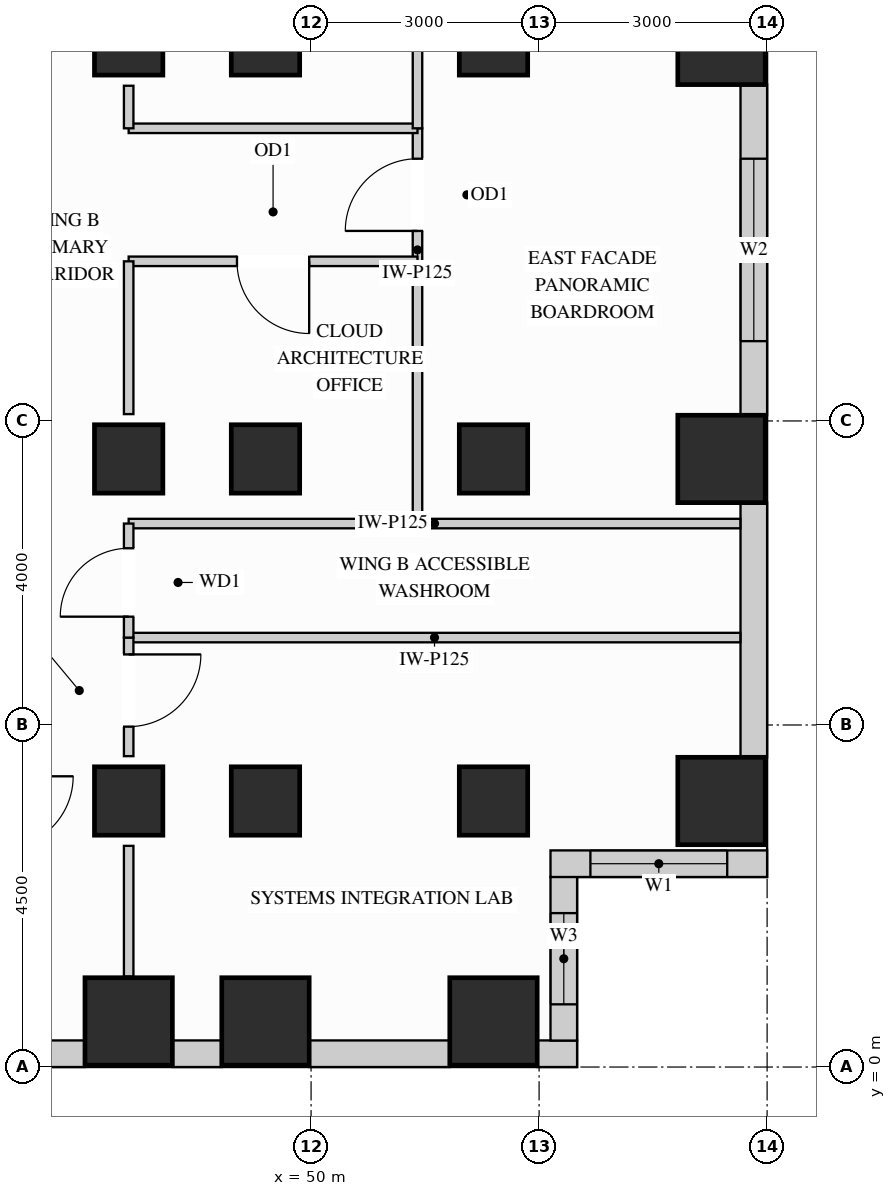
"""IFC4 building model, lengths in metres.
Left out: names, types, materials, properties, quantities, classifications, styles, units other than length and angle.
Written with IfcOpenShell. Run it as: python <this file> out.ifc"""

import sys

from ifc_helpers import new_model, si_unit, direction, frame, frame_2d, origin, origin_2d, place, context, subcontext, project, spatial, rectangle, extrude, source, transform, mapped, element, fill, save


model = new_model("IFC4")
c1 = context("Model", 3, precision=1e-05, world=origin(), true_north=direction((0.0, 1.0)))
c2 = subcontext(c1, "Body", "Model", "MODEL_VIEW")
j1 = project(units=[si_unit("LENGTHUNIT", "METRE"), si_unit("PLANEANGLEUNIT", "RADIAN")], contexts=[c1])
p1 = place(None, origin())
s1 = spatial("IfcSite", under=j1, at=p1, CompositionType="ELEMENT")
p2 = place(p1, origin())
s2 = spatial("IfcBuilding", under=s1, at=p2, CompositionType="ELEMENT")
p3 = place(p2, frame((0.0, 0.0, 102.6)))
s3 = spatial("IfcBuildingStorey", under=s2, at=p3, CompositionType="ELEMENT", Elevation=102.6)
m1 = source(origin(), c2, "Body", "SweptSolid", [
    extrude(rectangle(XDim=0.9, YDim=0.9, at=origin_2d()), origin(), (0.0, 0.0, 1.0), 3.38),
])
for number, where, z_axis, x_axis in (
    (1, (47.6, 13.5, 0.0), (0.0, 0.0, 1.0), (1.0, 0.0, 0.0)),
    (2, (47.6, 3.5, 0.0), (0.0, 0.0, 1.0), (1.0, 0.0, 0.0)),
    (3, (47.6, 8.0, 0.0), (0.0, 0.0, 1.0), (1.0, 0.0, 0.0)),
    (4, (49.4, 13.5, 0.0), (0.0, 0.0, 1.0), (1.0, 0.0, 0.0)),
    (5, (49.4, 3.5, 0.0), (0.0, 0.0, 1.0), (1.0, 0.0, 0.0)),
    (6, (49.4, 8.0, 0.0), (0.0, 0.0, 1.0), (1.0, 0.0, 0.0)),
    (7, (52.4, 13.5, 0.0), (0.0, 0.0, 1.0), (1.0, 0.0, 0.0)),
    (8, (52.4, 3.5, 0.0), (0.0, 0.0, 1.0), (1.0, 0.0, 0.0)),
    (9, (52.4, 8.0, 0.0), (0.0, 0.0, 1.0), (1.0, 0.0, 0.0)),
):
    element("IfcColumn", number, at=place(p3, frame(where, z_axis=z_axis, x_axis=x_axis)), inside=s3, PredefinedType="COLUMN", context=c2, shape_type="MappedRepresentation", body=[
        mapped(m1, transform((0.0, 0.0, 0.0), x_axis=(1.0, 0.0, 0.0), y_axis=(0.0, 1.0, 0.0), z_axis=(0.0, 0.0, 1.0))),
    ])
m2 = source(origin(), c2, "Body", "SweptSolid", [
    extrude(rectangle(XDim=1.15, YDim=1.15, at=origin_2d()), origin(), (0.0, 0.0, 1.0), 3.38),
])
for number, where, z_axis, x_axis in (
    (10, (55.4, 13.5, 0.0), (0.0, 0.0, 1.0), (1.0, 0.0, 0.0)),
    (11, (55.4, 3.5, 0.0), (0.0, 0.0, 1.0), (1.0, 0.0, 0.0)),
    (12, (55.4, 8.0, 0.0), (0.0, 0.0, 1.0), (1.0, 0.0, 0.0)),
    (13, (47.6, 0.6, 0.0), (0.0, 0.0, 1.0), (1.0, 0.0, 0.0)),
    (14, (49.4, 0.6, 0.0), (0.0, 0.0, 1.0), (1.0, 0.0, 0.0)),
    (15, (52.4, 0.6, 0.0), (0.0, 0.0, 1.0), (1.0, 0.0, 0.0)),
):
    element("IfcColumn", number, at=place(p3, frame(where, z_axis=z_axis, x_axis=x_axis)), inside=s3, PredefinedType="COLUMN", context=c2, shape_type="MappedRepresentation", body=[
        mapped(m2, transform((0.0, 0.0, 0.0), x_axis=(1.0, 0.0, 0.0), y_axis=(0.0, 1.0, 0.0), z_axis=(0.0, 0.0, 1.0))),
    ])
p4 = place(p3, frame((40.573, 0.175, 0.0), z_axis=(0.0, 0.0, 1.0), x_axis=(1.0, 0.0, 0.0)))
e16 = element("IfcWall", 16, at=p4, inside=s3, PredefinedType="SOLIDWALL", context=c2, shape_type="SweptSolid", body=[
    extrude(rectangle(XDim=6.454, YDim=0.35, at=frame_2d((3.227, 0.0))), origin(), (0.0, 0.0, 1.0), 2.428),
])
p5 = place(p4, frame((0.712, 0.0, 0.78)))
e17 = element("IfcOpeningElement", 17, at=p5, cuts=e16, PredefinedType="OPENING", context=c2, shape_type="SweptSolid", body=[
    extrude(rectangle(XDim=1.8, YDim=1.468, at=frame_2d((0.9, 0.734))), frame((0.0, 0.185, 0.0), z_axis=(0.0, -1.0, 0.0), x_axis=(1.0, 0.0, 0.0)), (0.0, 0.0, 1.0), 0.37),
])
p6 = place(p4, frame((2.905, 0.0, 0.78)))
e18 = element("IfcOpeningElement", 18, at=p6, cuts=e16, PredefinedType="OPENING", context=c2, shape_type="SweptSolid", body=[
    extrude(rectangle(XDim=1.8, YDim=1.468, at=frame_2d((0.9, 0.734))), frame((0.0, 0.185, 0.0), z_axis=(0.0, -1.0, 0.0), x_axis=(1.0, 0.0, 0.0)), (0.0, 0.0, 1.0), 0.37),
])
m3 = source(origin(), c2, "Body", "SweptSolid", [
    extrude(rectangle(XDim=0.654, YDim=0.35, at=frame_2d((0.327, 0.0))), origin(), (0.0, 0.0, 1.0), 3.365),
])
p7 = place(p3, frame((48.173, 0.175, 0.0), z_axis=(0.0, 0.0, 1.0), x_axis=(1.0, 0.0, 0.0)))
e19 = element("IfcWall", 19, at=p7, inside=s3, PredefinedType="SOLIDWALL", context=c2, shape_type="MappedRepresentation", body=[
    mapped(m3, transform((0.0, 0.0, 0.0), x_axis=(1.0, 0.0, 0.0), y_axis=(0.0, 1.0, 0.0), z_axis=(0.0, 0.0, 1.0))),
])
m4 = source(origin(), c2, "Body", "SweptSolid", [
    extrude(rectangle(XDim=1.854, YDim=0.35, at=frame_2d((0.927, 0.0))), origin(), (0.0, 0.0, 1.0), 3.365),
])
p8 = place(p3, frame((49.973, 0.175, 0.0), z_axis=(0.0, 0.0, 1.0), x_axis=(1.0, 0.0, 0.0)))
e20 = element("IfcWall", 20, at=p8, inside=s3, PredefinedType="SOLIDWALL", context=c2, shape_type="MappedRepresentation", body=[
    mapped(m4, transform((0.0, 0.0, 0.0), x_axis=(1.0, 0.0, 0.0), y_axis=(0.0, 1.0, 0.0), z_axis=(0.0, 0.0, 1.0))),
])
m5 = source(origin(), c2, "Body", "SweptSolid", [
    extrude(rectangle(XDim=0.527, YDim=0.35, at=frame_2d((0.264, 0.0))), origin(), (0.0, 0.0, 1.0), 3.365),
])
p9 = place(p3, frame((52.973, 0.175, 0.0), z_axis=(0.0, 0.0, 1.0), x_axis=(1.0, 0.0, 0.0)))
e21 = element("IfcWall", 21, at=p9, inside=s3, PredefinedType="SOLIDWALL", context=c2, shape_type="MappedRepresentation", body=[
    mapped(m5, transform((0.0, 0.0, 0.0), x_axis=(1.0, 0.0, 0.0), y_axis=(0.0, 1.0, 0.0), z_axis=(0.0, 0.0, 1.0))),
])
p10 = place(p3, frame((53.325, 0.348, 0.0), z_axis=(0.0, 0.0, 1.0), x_axis=(0.0, 1.0, 0.0)))
e22 = element("IfcWall", 22, at=p10, inside=s3, PredefinedType="SOLIDWALL", context=c2, shape_type="SweptSolid", body=[
    extrude(rectangle(XDim=2.154, YDim=0.35, at=frame_2d((1.077, 0.0))), origin(), (0.0, 0.0, 1.0), 3.365),
])
p11 = place(p10, frame((0.477, 0.0, 0.78)))
e23 = element("IfcOpeningElement", 23, at=p11, cuts=e22, PredefinedType="OPENING", context=c2, shape_type="SweptSolid", body=[
    extrude(rectangle(XDim=1.2, YDim=2.1, at=frame_2d((0.6, 1.05))), frame((0.0, 0.185, 0.0), z_axis=(0.0, -1.0, 0.0), x_axis=(1.0, 0.0, 0.0)), (0.0, 0.0, 1.0), 0.37),
])
p12 = place(p3, frame((53.15, 2.675, 0.0), z_axis=(0.0, 0.0, 1.0), x_axis=(1.0, 0.0, 0.0)))
e24 = element("IfcWall", 24, at=p12, inside=s3, PredefinedType="SOLIDWALL", context=c2, shape_type="SweptSolid", body=[
    extrude(rectangle(XDim=2.85, YDim=0.35, at=frame_2d((1.425, 0.0))), origin(), (0.0, 0.0, 1.0), 3.365),
])
p13 = place(p12, frame((0.525, 0.0, 0.78)))
e25 = element("IfcOpeningElement", 25, at=p13, cuts=e24, PredefinedType="OPENING", context=c2, shape_type="SweptSolid", body=[
    extrude(rectangle(XDim=1.8, YDim=2.1, at=frame_2d((0.9, 1.05))), frame((0.0, 0.185, 0.0), z_axis=(0.0, -1.0, 0.0), x_axis=(1.0, 0.0, 0.0)), (0.0, 0.0, 1.0), 0.37),
])
m6 = source(origin(), c2, "Body", "SweptSolid", [
    extrude(rectangle(XDim=3.354, YDim=0.35, at=frame_2d((1.677, 0.0))), origin(), (0.0, 0.0, 1.0), 3.365),
])
p14 = place(p3, frame((55.825, 4.073, 0.0), z_axis=(0.0, 0.0, 1.0), x_axis=(0.0, 1.0, 0.0)))
e26 = element("IfcWall", 26, at=p14, inside=s3, PredefinedType="SOLIDWALL", context=c2, shape_type="MappedRepresentation", body=[
    mapped(m6, transform((0.0, 0.0, 0.0), x_axis=(1.0, 0.0, 0.0), y_axis=(0.0, 1.0, 0.0), z_axis=(0.0, 0.0, 1.0))),
])
p15 = place(p3, frame((55.825, 8.573, 0.0), z_axis=(0.0, 0.0, 1.0), x_axis=(0.0, 1.0, 0.0)))
e27 = element("IfcWall", 27, at=p15, inside=s3, PredefinedType="SOLIDWALL", context=c2, shape_type="SweptSolid", body=[
    extrude(rectangle(XDim=4.354, YDim=0.35, at=frame_2d((2.177, 0.0))), origin(), (0.0, 0.0, 1.0), 3.365),
])
p16 = place(p15, frame((0.977, 0.0, 0.78)))
e28 = element("IfcOpeningElement", 28, at=p16, cuts=e27, PredefinedType="OPENING", context=c2, shape_type="SweptSolid", body=[
    extrude(rectangle(XDim=2.4, YDim=2.1, at=frame_2d((1.2, 1.05))), frame((0.0, 0.185, 0.0), z_axis=(0.0, -1.0, 0.0), x_axis=(1.0, 0.0, 0.0)), (0.0, 0.0, 1.0), 0.37),
])
p17 = place(p3, frame((51.4, 10.6, 0.0), z_axis=(0.0, 0.0, 1.0), x_axis=(0.0, 1.0, 0.0)))
e29 = element("IfcWall", 29, at=p17, inside=s3, PredefinedType="PARTITIONING", context=c2, shape_type="SweptSolid", body=[
    extrude(rectangle(XDim=1.75, YDim=0.125, at=frame_2d((0.875, 0.0))), origin(), (0.0, 0.0, 1.0), 3.365),
])
p18 = place(p17, frame((0.4, 0.0, 0.0)))
e30 = element("IfcOpeningElement", 30, at=p18, cuts=e29, PredefinedType="OPENING", context=c2, shape_type="SweptSolid", body=[
    extrude(rectangle(XDim=0.95, YDim=2.15, at=frame_2d((0.475, 1.075))), frame((0.0, 0.073, 0.0), z_axis=(0.0, -1.0, 0.0), x_axis=(1.0, 0.0, 0.0)), (0.0, 0.0, 1.0), 0.145),
])
m7 = source(origin(), c2, "Body", "SweptSolid", [
    extrude(rectangle(XDim=8.048, YDim=0.125, at=frame_2d((4.024, 0.0))), origin(), (0.0, 0.0, 1.0), 3.365),
])
for number, where, z_axis, x_axis in (
    (31, (47.6, 5.65, 0.0), (0.0, 0.0, 1.0), (1.0, 0.0, 0.0)),
    (32, (47.6, 7.15, 0.0), (0.0, 0.0, 1.0), (1.0, 0.0, 0.0)),
):
    element("IfcWall", number, at=place(p3, frame(where, z_axis=z_axis, x_axis=x_axis)), inside=s3, PredefinedType="PARTITIONING", context=c2, shape_type="MappedRepresentation", body=[
        mapped(m7, transform((0.0, 0.0, 0.0), x_axis=(1.0, 0.0, 0.0), y_axis=(0.0, 1.0, 0.0), z_axis=(0.0, 0.0, 1.0))),
    ])
m8 = source(origin(), c2, "Body", "SweptSolid", [
    extrude(rectangle(XDim=3.8, YDim=0.125, at=frame_2d((1.9, 0.0))), origin(), (0.0, 0.0, 1.0), 3.365),
])
p19 = place(p3, frame((47.6, 12.35, 0.0), z_axis=(0.0, 0.0, 1.0), x_axis=(1.0, 0.0, 0.0)))
e33 = element("IfcWall", 33, at=p19, inside=s3, PredefinedType="PARTITIONING", context=c2, shape_type="MappedRepresentation", body=[
    mapped(m8, transform((0.0, 0.0, 0.0), x_axis=(1.0, 0.0, 0.0), y_axis=(0.0, 1.0, 0.0), z_axis=(0.0, 0.0, 1.0))),
])
p20 = place(p3, frame((47.6, 10.6, 0.0), z_axis=(0.0, 0.0, 1.0), x_axis=(1.0, 0.0, 0.0)))
e34 = element("IfcWall", 34, at=p20, inside=s3, PredefinedType="PARTITIONING", context=c2, shape_type="SweptSolid", body=[
    extrude(rectangle(XDim=3.8, YDim=0.125, at=frame_2d((1.9, 0.0))), origin(), (0.0, 0.0, 1.0), 2.677),
])
p21 = place(p20, frame((1.425, 0.0, 0.0)))
e35 = element("IfcOpeningElement", 35, at=p21, cuts=e34, PredefinedType="OPENING", context=c2, shape_type="SweptSolid", body=[
    extrude(rectangle(XDim=0.95, YDim=2.15, at=frame_2d((0.475, 1.075))), frame((0.0, 0.073, 0.0), z_axis=(0.0, -1.0, 0.0), x_axis=(1.0, 0.0, 0.0)), (0.0, 0.0, 1.0), 0.145),
])
m9 = source(origin(), c2, "Body", "SweptSolid", [
    extrude(rectangle(XDim=3.45, YDim=0.125, at=frame_2d((1.725, 0.0))), origin(), (0.0, 0.0, 1.0), 3.365),
])
p22 = place(p3, frame((51.4, 7.15, 0.0), z_axis=(0.0, 0.0, 1.0), x_axis=(0.0, 1.0, 0.0)))
e36 = element("IfcWall", 36, at=p22, inside=s3, PredefinedType="PARTITIONING", context=c2, shape_type="MappedRepresentation", body=[
    mapped(m9, transform((0.0, 0.0, 0.0), x_axis=(1.0, 0.0, 0.0), y_axis=(0.0, 1.0, 0.0), z_axis=(0.0, 0.0, 1.0))),
])
m10 = source(origin(), c2, "Body", "SweptSolid", [
    extrude(rectangle(XDim=9.79, YDim=0.125, at=frame_2d((4.895, 0.0))), origin(), (0.0, 0.0, 1.0), 3.365),
])
p23 = place(p3, frame((51.4, 12.35, 0.0), z_axis=(0.0, 0.0, 1.0), x_axis=(0.0, 1.0, 0.0)))
e37 = element("IfcWall", 37, at=p23, inside=s3, PredefinedType="PARTITIONING", context=c2, shape_type="MappedRepresentation", body=[
    mapped(m10, transform((0.0, 0.0, 0.0), x_axis=(1.0, 0.0, 0.0), y_axis=(0.0, 1.0, 0.0), z_axis=(0.0, 0.0, 1.0))),
])
p24 = place(p3, frame((47.6, 4.09, 0.0), z_axis=(0.0, 0.0, 1.0), x_axis=(0.0, 1.0, 0.0)))
e38 = element("IfcWall", 38, at=p24, inside=s3, PredefinedType="PARTITIONING", context=c2, shape_type="SweptSolid", body=[
    extrude(rectangle(XDim=1.56, YDim=0.125, at=frame_2d((0.78, 0.0))), origin(), (0.0, 0.0, 1.0), 2.677),
])
p25 = place(p24, frame((0.388, 0.0, 0.0)))
e39 = element("IfcOpeningElement", 39, at=p25, cuts=e38, PredefinedType="OPENING", context=c2, shape_type="SweptSolid", body=[
    extrude(rectangle(XDim=0.95, YDim=2.15, at=frame_2d((0.475, 1.075))), frame((0.0, 0.073, 0.0), z_axis=(0.0, -1.0, 0.0), x_axis=(1.0, 0.0, 0.0)), (0.0, 0.0, 1.0), 0.145),
])
m11 = source(origin(), c2, "Body", "SweptSolid", [
    extrude(rectangle(XDim=1.72, YDim=0.125, at=frame_2d((0.86, 0.0))), origin(), (0.0, 0.0, 1.0), 2.677),
])
p26 = place(p3, frame((47.6, 1.19, 0.0), z_axis=(0.0, 0.0, 1.0), x_axis=(0.0, 1.0, 0.0)))
e40 = element("IfcWall", 40, at=p26, inside=s3, PredefinedType="PARTITIONING", context=c2, shape_type="MappedRepresentation", body=[
    mapped(m11, transform((0.0, 0.0, 0.0), x_axis=(1.0, 0.0, 0.0), y_axis=(0.0, 1.0, 0.0), z_axis=(0.0, 0.0, 1.0))),
])
m12 = source(origin(), c2, "Body", "SweptSolid", [
    extrude(rectangle(XDim=2.01, YDim=0.125, at=frame_2d((1.005, 0.0))), origin(), (0.0, 0.0, 1.0), 2.677),
])
p27 = place(p3, frame((47.6, 8.59, 0.0), z_axis=(0.0, 0.0, 1.0), x_axis=(0.0, 1.0, 0.0)))
e41 = element("IfcWall", 41, at=p27, inside=s3, PredefinedType="PARTITIONING", context=c2, shape_type="MappedRepresentation", body=[
    mapped(m12, transform((0.0, 0.0, 0.0), x_axis=(1.0, 0.0, 0.0), y_axis=(0.0, 1.0, 0.0), z_axis=(0.0, 0.0, 1.0))),
])
m13 = source(origin(), c2, "Body", "SweptSolid", [
    extrude(rectangle(XDim=0.56, YDim=0.125, at=frame_2d((0.28, 0.0))), origin(), (0.0, 0.0, 1.0), 2.677),
])
p28 = place(p3, frame((47.6, 12.35, 0.0), z_axis=(0.0, 0.0, 1.0), x_axis=(0.0, 1.0, 0.0)))
e42 = element("IfcWall", 42, at=p28, inside=s3, PredefinedType="PARTITIONING", context=c2, shape_type="MappedRepresentation", body=[
    mapped(m13, transform((0.0, 0.0, 0.0), x_axis=(1.0, 0.0, 0.0), y_axis=(0.0, 1.0, 0.0), z_axis=(0.0, 0.0, 1.0))),
])
p29 = place(p3, frame((47.6, 5.65, 0.0), z_axis=(0.0, 0.0, 1.0), x_axis=(0.0, 1.0, 0.0)))
e43 = element("IfcWall", 43, at=p29, inside=s3, PredefinedType="PARTITIONING", context=c2, shape_type="SweptSolid", body=[
    extrude(rectangle(XDim=1.5, YDim=0.125, at=frame_2d((0.75, 0.0))), origin(), (0.0, 0.0, 1.0), 2.677),
])
p30 = place(p29, frame((0.275, 0.0, 0.0)))
e44 = element("IfcOpeningElement", 44, at=p30, cuts=e43, PredefinedType="OPENING", context=c2, shape_type="SweptSolid", body=[
    extrude(rectangle(XDim=0.9, YDim=2.15, at=frame_2d((0.45, 1.075))), frame((0.0, 0.073, 0.0), z_axis=(0.0, -1.0, 0.0), x_axis=(1.0, 0.0, 0.0)), (0.0, 0.0, 1.0), 0.145),
])
m14 = source(origin(), c2, "Body", "SweptSolid", [
    extrude(rectangle(XDim=0.95, YDim=2.15, at=frame_2d((0.475, 1.075))), frame((0.0, 0.025, 0.0), z_axis=(0.0, -1.0, 0.0), x_axis=(1.0, 0.0, 0.0)), (0.0, 0.0, 1.0), 0.05),
])
p31 = place(p25, origin())
e45 = element("IfcDoor", 45, at=p31, inside=s3, OperationType="SINGLE_SWING_RIGHT", PredefinedType="DOOR", context=c2, shape_type="MappedRepresentation", body=[
    mapped(m14, transform((0.0, 0.0, 0.0), x_axis=(1.0, 0.0, 0.0), y_axis=(0.0, 1.0, 0.0), z_axis=(0.0, 0.0, 1.0))),
])
fill(e39, e45)
p32 = place(p21, origin())
e46 = element("IfcDoor", 46, at=p32, inside=s3, OperationType="SINGLE_SWING_RIGHT", PredefinedType="DOOR", context=c2, shape_type="MappedRepresentation", body=[
    mapped(m14, transform((0.0, 0.0, 0.0), x_axis=(1.0, 0.0, 0.0), y_axis=(0.0, 1.0, 0.0), z_axis=(0.0, 0.0, 1.0))),
])
fill(e35, e46)
p33 = place(p18, origin())
e47 = element("IfcDoor", 47, at=p33, inside=s3, OperationType="SINGLE_SWING_LEFT", PredefinedType="DOOR", context=c2, shape_type="MappedRepresentation", body=[
    mapped(m14, transform((0.0, 0.0, 0.0), x_axis=(1.0, 0.0, 0.0), y_axis=(0.0, 1.0, 0.0), z_axis=(0.0, 0.0, 1.0))),
])
fill(e30, e47)
m15 = source(origin(), c2, "Body", "SweptSolid", [
    extrude(rectangle(XDim=0.9, YDim=2.15, at=frame_2d((0.45, 1.075))), frame((0.0, 0.025, 0.0), z_axis=(0.0, -1.0, 0.0), x_axis=(1.0, 0.0, 0.0)), (0.0, 0.0, 1.0), 0.05),
])
p34 = place(p30, origin())
e48 = element("IfcDoor", 48, at=p34, inside=s3, OperationType="SINGLE_SWING_LEFT", PredefinedType="DOOR", context=c2, shape_type="MappedRepresentation", body=[
    mapped(m15, transform((0.0, 0.0, 0.0), x_axis=(1.0, 0.0, 0.0), y_axis=(0.0, 1.0, 0.0), z_axis=(0.0, 0.0, 1.0))),
])
fill(e44, e48)
m16 = source(origin(), c2, "Body", "SweptSolid", [
    extrude(rectangle(XDim=1.8, YDim=2.1, at=frame_2d((0.9, 1.05))), frame((0.0, 0.03, 0.0), z_axis=(0.0, -1.0, 0.0), x_axis=(1.0, 0.0, 0.0)), (0.0, 0.0, 1.0), 0.06),
])
p35 = place(p13, origin())
e49 = element("IfcWindow", 49, at=p35, inside=s3, PartitioningType="SINGLE_PANEL", PredefinedType="WINDOW", context=c2, shape_type="MappedRepresentation", body=[
    mapped(m16, transform((0.0, 0.0, 0.0), x_axis=(1.0, 0.0, 0.0), y_axis=(0.0, 1.0, 0.0), z_axis=(0.0, 0.0, 1.0))),
])
fill(e25, e49)
m17 = source(origin(), c2, "Body", "SweptSolid", [
    extrude(rectangle(XDim=2.4, YDim=2.1, at=frame_2d((1.2, 1.05))), frame((0.0, 0.03, 0.0), z_axis=(0.0, -1.0, 0.0), x_axis=(1.0, 0.0, 0.0)), (0.0, 0.0, 1.0), 0.06),
])
p36 = place(p16, origin())
e50 = element("IfcWindow", 50, at=p36, inside=s3, PartitioningType="SINGLE_PANEL", PredefinedType="WINDOW", context=c2, shape_type="MappedRepresentation", body=[
    mapped(m17, transform((0.0, 0.0, 0.0), x_axis=(1.0, 0.0, 0.0), y_axis=(0.0, 1.0, 0.0), z_axis=(0.0, 0.0, 1.0))),
])
fill(e28, e50)
m18 = source(origin(), c2, "Body", "SweptSolid", [
    extrude(rectangle(XDim=1.2, YDim=2.1, at=frame_2d((0.6, 1.05))), frame((0.0, 0.03, 0.0), z_axis=(0.0, -1.0, 0.0), x_axis=(1.0, 0.0, 0.0)), (0.0, 0.0, 1.0), 0.06),
])
p37 = place(p11, origin())
e51 = element("IfcWindow", 51, at=p37, inside=s3, PartitioningType="SINGLE_PANEL", PredefinedType="WINDOW", context=c2, shape_type="MappedRepresentation", body=[
    mapped(m18, transform((0.0, 0.0, 0.0), x_axis=(1.0, 0.0, 0.0), y_axis=(0.0, 1.0, 0.0), z_axis=(0.0, 0.0, 1.0))),
])
fill(e23, e51)
save(model, sys.argv[1])
